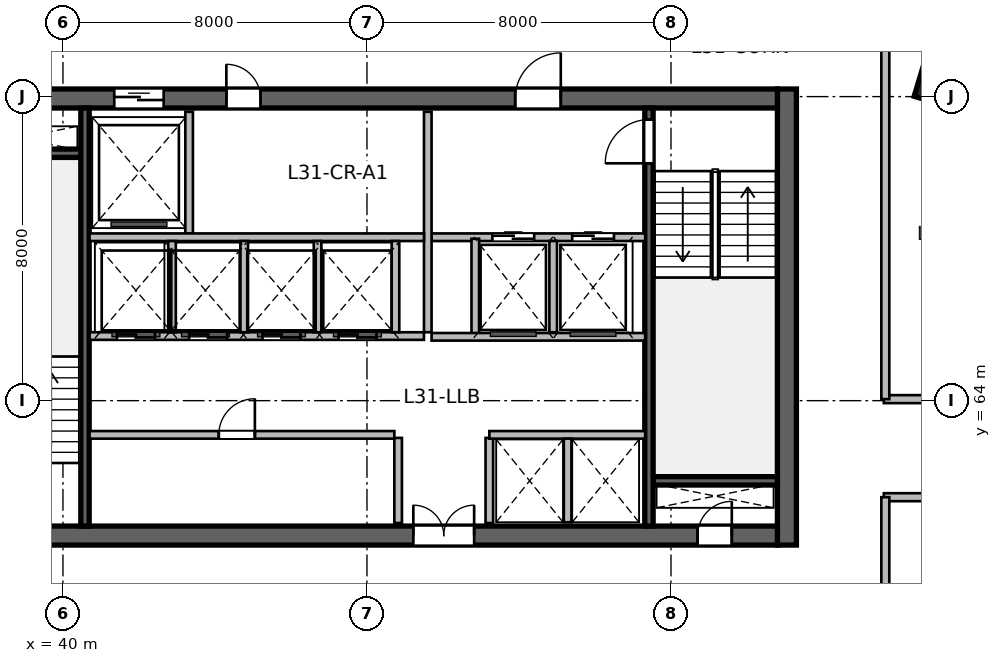
"""IFC4 building model, lengths in metres.
Left out: names, types, materials, properties, quantities, classifications, styles, units other than length and angle.
Written with IfcOpenShell. Run it as: python <this file> out.ifc"""

import sys

from ifc_helpers import new_model, si_unit, direction, frame, frame_2d, origin, origin_2d, place, context, subcontext, project, spatial, rectangle, extrude, source, transform, mapped, element, fill, save


model = new_model("IFC4")
c1 = context("Model", 3, precision=1e-05, world=origin(), true_north=direction((0.0, 1.0)))
c2 = subcontext(c1, "Body", "Model", "MODEL_VIEW")
j1 = project(units=[si_unit("LENGTHUNIT", "METRE"), si_unit("PLANEANGLEUNIT", "RADIAN")], contexts=[c1])
p1 = place(None, origin())
s1 = spatial("IfcSite", under=j1, at=p1, CompositionType="ELEMENT")
p2 = place(p1, origin())
s2 = spatial("IfcBuilding", under=s1, at=p2, CompositionType="ELEMENT")
p3 = place(p2, frame((0.0, 0.0, 131.1)))
s3 = spatial("IfcBuildingStorey", under=s2, at=p3, CompositionType="ELEMENT", Elevation=131.1)
m1 = source(origin(), c2, "Body", "SweptSolid", [
    extrude(rectangle(XDim=12.0, YDim=0.5, at=frame_2d((6.0, 0.0))), origin(), (0.0, 0.0, 1.0), 3.9),
])
p4 = place(p3, frame((59.05, 60.2, 0.0), z_axis=(0.0, 0.0, 1.0), x_axis=(0.0, 1.0, 0.0)))
e1 = element("IfcWall", 1, at=p4, inside=s3, PredefinedType="SHEAR", context=c2, shape_type="MappedRepresentation", body=[
    mapped(m1, transform((0.0, 0.0, 0.0), scale=1.0)),
])
m2 = source(origin(), c2, "Body", "SweptSolid", [
    extrude(rectangle(XDim=21.6, YDim=0.5, at=frame_2d((10.8, 0.0))), origin(), (0.0, 0.0, 1.0), 3.9),
])
p5 = place(p3, frame((37.2, 60.45, 0.0), z_axis=(0.0, 0.0, 1.0), x_axis=(1.0, 0.0, 0.0)))
e2 = element("IfcWall", 2, at=p5, inside=s3, PredefinedType="SHEAR", context=c2, shape_type="MappedRepresentation", body=[
    mapped(m2, transform((0.0, 0.0, 0.0), scale=1.0)),
])
p6 = place(p5, frame((1.1, 0.0, 0.0)))
e3 = element("IfcOpeningElement", 3, at=p6, cuts=e2, PredefinedType="OPENING", context=c2, shape_type="SweptSolid", body=[
    extrude(rectangle(XDim=1.15, YDim=2.15, at=frame_2d((0.575, 1.075))), frame((0.0, 0.26, 0.0), z_axis=(0.0, -1.0, 0.0), x_axis=(1.0, 0.0, 0.0)), (0.0, 0.0, 1.0), 0.52),
])
p7 = place(p5, frame((19.5, 0.0, 0.0)))
e4 = element("IfcOpeningElement", 4, at=p7, cuts=e2, PredefinedType="OPENING", context=c2, shape_type="SweptSolid", body=[
    extrude(rectangle(XDim=0.9, YDim=2.1, at=frame_2d((0.45, 1.05))), frame((0.0, 0.26, 0.0), z_axis=(0.0, -1.0, 0.0), x_axis=(1.0, 0.0, 0.0)), (0.0, 0.0, 1.0), 0.52),
])
p8 = place(p5, frame((12.02, 0.0, 0.0)))
e5 = element("IfcOpeningElement", 5, at=p8, cuts=e2, PredefinedType="OPENING", context=c2, shape_type="SweptSolid", body=[
    extrude(rectangle(XDim=1.6, YDim=2.15, at=frame_2d((0.8, 1.075))), frame((0.0, 0.26, 0.0), z_axis=(0.0, -1.0, 0.0), x_axis=(1.0, 0.0, 0.0)), (0.0, 0.0, 1.0), 0.52),
])
p9 = place(p3, frame((37.2, 71.95, 0.0), z_axis=(0.0, 0.0, 1.0), x_axis=(1.0, 0.0, 0.0)))
e6 = element("IfcWall", 6, at=p9, inside=s3, PredefinedType="SHEAR", context=c2, shape_type="MappedRepresentation", body=[
    mapped(m2, transform((0.0, 0.0, 0.0), scale=1.0)),
])
p10 = place(p9, frame((1.2, 0.0, 0.0)))
e7 = element("IfcOpeningElement", 7, at=p10, cuts=e6, PredefinedType="OPENING", context=c2, shape_type="SweptSolid", body=[
    extrude(rectangle(XDim=0.9, YDim=2.1, at=frame_2d((0.45, 1.05))), frame((0.0, 0.26, 0.0), z_axis=(0.0, -1.0, 0.0), x_axis=(1.0, 0.0, 0.0)), (0.0, 0.0, 1.0), 0.52),
])
p11 = place(p9, frame((14.7, 0.0, 0.0)))
e8 = element("IfcOpeningElement", 8, at=p11, cuts=e6, PredefinedType="OPENING", context=c2, shape_type="SweptSolid", body=[
    extrude(rectangle(XDim=1.2, YDim=2.15, at=frame_2d((0.6, 1.075))), frame((0.0, 0.26, 0.0), z_axis=(0.0, -1.0, 0.0), x_axis=(1.0, 0.0, 0.0)), (0.0, 0.0, 1.0), 0.52),
])
p12 = place(p9, frame((4.15, 0.0, 0.0)))
e9 = element("IfcOpeningElement", 9, at=p12, cuts=e6, PredefinedType="OPENING", context=c2, shape_type="SweptSolid", body=[
    extrude(rectangle(XDim=1.3, YDim=2.15, at=frame_2d((0.65, 1.075))), frame((0.0, 0.26, 0.0), z_axis=(0.0, -1.0, 0.0), x_axis=(1.0, 0.0, 0.0)), (0.0, 0.0, 1.0), 0.52),
])
p13 = place(p9, frame((7.1, 0.0, 0.0)))
e10 = element("IfcOpeningElement", 10, at=p13, cuts=e6, PredefinedType="OPENING", context=c2, shape_type="SweptSolid", body=[
    extrude(rectangle(XDim=0.9, YDim=2.1, at=frame_2d((0.45, 1.05))), frame((0.0, 0.26, 0.0), z_axis=(0.0, -1.0, 0.0), x_axis=(1.0, 0.0, 0.0)), (0.0, 0.0, 1.0), 0.52),
])
m3 = source(origin(), c2, "Body", "SweptSolid", [
    extrude(rectangle(XDim=3.27, YDim=0.22, at=frame_2d((1.635, 0.0))), origin(), (0.0, 0.0, 1.0), 3.9),
])
for number, where, z_axis, x_axis in (
    (11, (37.2, 70.51, 0.0), (0.0, 0.0, 1.0), (1.0, 0.0, 0.0)),
    (12, (55.53, 61.89, 0.0), (0.0, 0.0, 1.0), (1.0, 0.0, 0.0)),
):
    element("IfcWall", number, at=place(p3, frame(where, z_axis=z_axis, x_axis=x_axis)), inside=s3, PredefinedType="SHEAR", context=c2, shape_type="MappedRepresentation", body=[
        mapped(m3, transform((0.0, 0.0, 0.0), scale=1.0)),
    ])
m4 = source(origin(), c2, "Body", "SweptSolid", [
    extrude(rectangle(XDim=11.0, YDim=0.22, at=frame_2d((5.5, 0.0))), origin(), (0.0, 0.0, 1.0), 3.9),
])
p14 = place(p3, frame((40.58, 60.7, 0.0), z_axis=(0.0, 0.0, 1.0), x_axis=(0.0, 1.0, 0.0)))
e13 = element("IfcWall", 13, at=p14, inside=s3, PredefinedType="SHEAR", context=c2, shape_type="MappedRepresentation", body=[
    mapped(m4, transform((0.0, 0.0, 0.0), scale=1.0)),
])
p15 = place(p3, frame((55.42, 60.7, 0.0), z_axis=(0.0, 0.0, 1.0), x_axis=(0.0, 1.0, 0.0)))
e14 = element("IfcWall", 14, at=p15, inside=s3, PredefinedType="SHEAR", context=c2, shape_type="MappedRepresentation", body=[
    mapped(m4, transform((0.0, 0.0, 0.0), scale=1.0)),
])
p16 = place(p15, frame((9.545, 0.0, 0.0)))
e15 = element("IfcOpeningElement", 15, at=p16, cuts=e14, PredefinedType="OPENING", context=c2, shape_type="SweptSolid", body=[
    extrude(rectangle(XDim=1.15, YDim=2.15, at=frame_2d((0.575, 1.075))), frame((0.0, 0.12, 0.0), z_axis=(0.0, -1.0, 0.0), x_axis=(1.0, 0.0, 0.0)), (0.0, 0.0, 1.0), 0.24),
])
m5 = source(origin(), c2, "Body", "SweptSolid", [
    extrude(rectangle(XDim=1.3, YDim=1.3, at=origin_2d()), origin(), (0.0, 0.0, 1.0), 3.9),
])
p17 = place(p3, frame((63.209, 72.442, 0.0), z_axis=(0.0, 0.0, 1.0), x_axis=(0.288697611798, 0.957420330337, 0.0)))
e16 = element("IfcColumn", 16, at=p17, inside=s3, PredefinedType="COLUMN", context=c2, shape_type="MappedRepresentation", body=[
    mapped(m5, transform((0.0, 0.0, 0.0), scale=1.0)),
])
m6 = source(origin(), c2, "Body", "SweptSolid", [
    extrude(rectangle(XDim=2.24, YDim=0.2, at=frame_2d((1.12, 0.0))), origin(), (0.0, 0.0, 1.0), 3.65),
])
for number, where, z_axis, x_axis in (
    (17, (48.82, 60.78, 0.0), (0.0, 0.0, 1.0), (0.0, 1.0, 0.0)),
    (18, (51.22, 60.78, 0.0), (0.0, 0.0, 1.0), (0.0, 1.0, 0.0)),
):
    element("IfcWall", number, at=place(p3, frame(where, z_axis=z_axis, x_axis=x_axis)), inside=s3, PredefinedType="SOLIDWALL", context=c2, shape_type="MappedRepresentation", body=[
        mapped(m6, transform((0.0, 0.0, 0.0), scale=1.0)),
    ])
m7 = source(origin(), c2, "Body", "SweptSolid", [
    extrude(rectangle(XDim=5.62, YDim=0.2, at=frame_2d((2.81, 0.0))), origin(), (0.0, 0.0, 1.0), 3.65),
])
p18 = place(p3, frame((49.7, 68.3, 0.0), z_axis=(0.0, 0.0, 1.0), x_axis=(1.0, 0.0, 0.0)))
e19 = element("IfcWall", 19, at=p18, inside=s3, PredefinedType="SOLIDWALL", context=c2, shape_type="MappedRepresentation", body=[
    mapped(m7, transform((0.0, 0.0, 0.0), scale=1.0)),
])
p19 = place(p18, frame((1.6, 0.0, 0.0)))
e20 = element("IfcOpeningElement", 20, at=p19, cuts=e19, PredefinedType="OPENING", context=c2, shape_type="SweptSolid", body=[
    extrude(rectangle(XDim=1.1, YDim=2.15, at=frame_2d((0.55, 1.075))), frame((0.0, 0.11, 0.0), z_axis=(0.0, -1.0, 0.0), x_axis=(1.0, 0.0, 0.0)), (0.0, 0.0, 1.0), 0.22),
])
p20 = place(p18, frame((3.7, 0.0, 0.0)))
e21 = element("IfcOpeningElement", 21, at=p20, cuts=e19, PredefinedType="OPENING", context=c2, shape_type="SweptSolid", body=[
    extrude(rectangle(XDim=1.1, YDim=2.15, at=frame_2d((0.55, 1.075))), frame((0.0, 0.11, 0.0), z_axis=(0.0, -1.0, 0.0), x_axis=(1.0, 0.0, 0.0)), (0.0, 0.0, 1.0), 0.22),
])
m8 = source(origin(), c2, "Body", "SweptSolid", [
    extrude(rectangle(XDim=5.8, YDim=0.2, at=frame_2d((2.9, 0.0))), origin(), (0.0, 0.0, 1.0), 3.65),
])
p21 = place(p3, frame((49.6, 65.8, 0.0), z_axis=(0.0, 0.0, 1.0), x_axis=(0.0, 1.0, 0.0)))
e22 = element("IfcWall", 22, at=p21, inside=s3, PredefinedType="SOLIDWALL", context=c2, shape_type="MappedRepresentation", body=[
    mapped(m8, transform((0.0, 0.0, 0.0), scale=1.0)),
])
m9 = source(origin(), c2, "Body", "SweptSolid", [
    extrude(rectangle(XDim=2.58, YDim=0.2, at=frame_2d((1.29, 0.0))), origin(), (0.0, 0.0, 1.0), 3.65),
])
p22 = place(p3, frame((50.85, 65.68, 0.0), z_axis=(0.0, 0.0, 1.0), x_axis=(0.0, 1.0, 0.0)))
e23 = element("IfcWall", 23, at=p22, inside=s3, PredefinedType="SOLIDWALL", context=c2, shape_type="MappedRepresentation", body=[
    mapped(m9, transform((0.0, 0.0, 0.0), scale=1.0)),
])
m10 = source(origin(), c2, "Body", "SweptSolid", [
    extrude(rectangle(XDim=2.4, YDim=0.2, at=frame_2d((1.2, 0.0))), origin(), (0.0, 0.0, 1.0), 3.65),
])
p23 = place(p3, frame((52.9, 65.8, 0.0), z_axis=(0.0, 0.0, 1.0), x_axis=(0.0, 1.0, 0.0)))
e24 = element("IfcWall", 24, at=p23, inside=s3, PredefinedType="SOLIDWALL", context=c2, shape_type="MappedRepresentation", body=[
    mapped(m10, transform((0.0, 0.0, 0.0), scale=1.0)),
])
p24 = place(p3, frame((49.7, 65.68, 0.0), z_axis=(0.0, 0.0, 1.0), x_axis=(1.0, 0.0, 0.0)))
e25 = element("IfcWall", 25, at=p24, inside=s3, PredefinedType="SOLIDWALL", context=c2, shape_type="MappedRepresentation", body=[
    mapped(m7, transform((0.0, 0.0, 0.0), scale=1.0)),
])
m11 = source(origin(), c2, "Body", "SweptSolid", [
    extrude(rectangle(XDim=3.2, YDim=0.2, at=frame_2d((1.6, 0.0))), origin(), (0.0, 0.0, 1.0), 3.65),
])
p25 = place(p3, frame((43.32, 68.4, 0.0), z_axis=(0.0, 0.0, 1.0), x_axis=(0.0, 1.0, 0.0)))
e26 = element("IfcWall", 26, at=p25, inside=s3, PredefinedType="SOLIDWALL", context=c2, shape_type="MappedRepresentation", body=[
    mapped(m11, transform((0.0, 0.0, 0.0), scale=1.0)),
])
m12 = source(origin(), c2, "Body", "SweptSolid", [
    extrude(rectangle(XDim=8.8, YDim=0.2, at=frame_2d((4.4, 0.0))), origin(), (0.0, 0.0, 1.0), 3.65),
])
p26 = place(p3, frame((40.7, 68.3, 0.0), z_axis=(0.0, 0.0, 1.0), x_axis=(1.0, 0.0, 0.0)))
e27 = element("IfcWall", 27, at=p26, inside=s3, PredefinedType="SOLIDWALL", context=c2, shape_type="MappedRepresentation", body=[
    mapped(m12, transform((0.0, 0.0, 0.0), scale=1.0)),
])
m13 = source(origin(), c2, "Body", "SweptSolid", [
    extrude(rectangle(XDim=8.02, YDim=0.2, at=frame_2d((4.01, 0.0))), origin(), (0.0, 0.0, 1.0), 3.65),
])
p27 = place(p3, frame((40.7, 63.1, 0.0), z_axis=(0.0, 0.0, 1.0), x_axis=(1.0, 0.0, 0.0)))
e28 = element("IfcWall", 28, at=p27, inside=s3, PredefinedType="SOLIDWALL", context=c2, shape_type="MappedRepresentation", body=[
    mapped(m13, transform((0.0, 0.0, 0.0), scale=1.0)),
])
p28 = place(p27, frame((3.4, 0.0, 0.0)))
e29 = element("IfcOpeningElement", 29, at=p28, cuts=e28, PredefinedType="OPENING", context=c2, shape_type="SweptSolid", body=[
    extrude(rectangle(XDim=0.95, YDim=2.15, at=frame_2d((0.475, 1.075))), frame((0.0, 0.11, 0.0), z_axis=(0.0, -1.0, 0.0), x_axis=(1.0, 0.0, 0.0)), (0.0, 0.0, 1.0), 0.22),
])
m14 = source(origin(), c2, "Body", "SweptSolid", [
    extrude(rectangle(XDim=4.1, YDim=0.2, at=frame_2d((2.05, 0.0))), origin(), (0.0, 0.0, 1.0), 3.65),
])
p29 = place(p3, frame((51.22, 63.1, 0.0), z_axis=(0.0, 0.0, 1.0), x_axis=(1.0, 0.0, 0.0)))
e30 = element("IfcWall", 30, at=p29, inside=s3, PredefinedType="SOLIDWALL", context=c2, shape_type="MappedRepresentation", body=[
    mapped(m14, transform((0.0, 0.0, 0.0), scale=1.0)),
])
m15 = source(origin(), c2, "Body", "SweptSolid", [
    extrude(rectangle(XDim=2.2, YDim=0.2, at=frame_2d((1.1, 0.0))), origin(), (0.0, 0.0, 1.0), 3.65),
])
p30 = place(p3, frame((53.28, 60.8, 0.0), z_axis=(0.0, 0.0, 1.0), x_axis=(0.0, 1.0, 0.0)))
e31 = element("IfcWall", 31, at=p30, inside=s3, PredefinedType="SOLIDWALL", context=c2, shape_type="MappedRepresentation", body=[
    mapped(m15, transform((0.0, 0.0, 0.0), scale=1.0)),
])
p31 = place(p3, frame((40.7, 65.7, 0.0), z_axis=(0.0, 0.0, 1.0), x_axis=(1.0, 0.0, 0.0)))
e32 = element("IfcWall", 32, at=p31, inside=s3, PredefinedType="SOLIDWALL", context=c2, shape_type="MappedRepresentation", body=[
    mapped(m12, transform((0.0, 0.0, 0.0), scale=1.0)),
])
p32 = place(p31, frame((0.72, 0.0, 0.0)))
e33 = element("IfcOpeningElement", 33, at=p32, cuts=e32, PredefinedType="OPENING", context=c2, shape_type="SweptSolid", body=[
    extrude(rectangle(XDim=1.0, YDim=2.15, at=frame_2d((0.5, 1.075))), frame((0.0, 0.11, 0.0), z_axis=(0.0, -1.0, 0.0), x_axis=(1.0, 0.0, 0.0)), (0.0, 0.0, 1.0), 0.22),
])
p33 = place(p31, frame((2.62, 0.0, 0.0)))
e34 = element("IfcOpeningElement", 34, at=p33, cuts=e32, PredefinedType="OPENING", context=c2, shape_type="SweptSolid", body=[
    extrude(rectangle(XDim=1.0, YDim=2.15, at=frame_2d((0.5, 1.075))), frame((0.0, 0.11, 0.0), z_axis=(0.0, -1.0, 0.0), x_axis=(1.0, 0.0, 0.0)), (0.0, 0.0, 1.0), 0.22),
])
p34 = place(p31, frame((4.55, 0.0, 0.0)))
e35 = element("IfcOpeningElement", 35, at=p34, cuts=e32, PredefinedType="OPENING", context=c2, shape_type="SweptSolid", body=[
    extrude(rectangle(XDim=1.0, YDim=2.15, at=frame_2d((0.5, 1.075))), frame((0.0, 0.11, 0.0), z_axis=(0.0, -1.0, 0.0), x_axis=(1.0, 0.0, 0.0)), (0.0, 0.0, 1.0), 0.22),
])
p35 = place(p31, frame((6.55, 0.0, 0.0)))
e36 = element("IfcOpeningElement", 36, at=p35, cuts=e32, PredefinedType="OPENING", context=c2, shape_type="SweptSolid", body=[
    extrude(rectangle(XDim=1.0, YDim=2.15, at=frame_2d((0.5, 1.075))), frame((0.0, 0.11, 0.0), z_axis=(0.0, -1.0, 0.0), x_axis=(1.0, 0.0, 0.0)), (0.0, 0.0, 1.0), 0.22),
])
for number, where, z_axis, x_axis in (
    (37, (48.75, 65.8, 0.0), (0.0, 0.0, 1.0), (0.0, 1.0, 0.0)),
    (38, (42.87, 65.8, 0.0), (0.0, 0.0, 1.0), (0.0, 1.0, 0.0)),
    (39, (44.77, 65.8, 0.0), (0.0, 0.0, 1.0), (0.0, 1.0, 0.0)),
    (40, (46.7, 65.8, 0.0), (0.0, 0.0, 1.0), (0.0, 1.0, 0.0)),
):
    element("IfcWall", number, at=place(p3, frame(where, z_axis=z_axis, x_axis=x_axis)), inside=s3, PredefinedType="SOLIDWALL", context=c2, shape_type="MappedRepresentation", body=[
        mapped(m10, transform((0.0, 0.0, 0.0), scale=1.0)),
    ])
m16 = source(origin(), c2, "Body", "SweptSolid", [
    extrude(rectangle(XDim=4.2, YDim=0.21, at=frame_2d((2.1, 0.0))), origin(), (0.0, 0.0, 1.0), 3.65),
])
p36 = place(p3, frame((61.6, 64.04, 0.0), z_axis=(0.0, 0.0, 1.0), x_axis=(1.0, 0.0, 0.0)))
e41 = element("IfcWall", 41, at=p36, inside=s3, PredefinedType="PARTITIONING", context=c2, shape_type="MappedRepresentation", body=[
    mapped(m16, transform((0.0, 0.0, 0.0), scale=1.0)),
])
p37 = place(p36, frame((1.625, 0.0, 0.0)))
e42 = element("IfcOpeningElement", 42, at=p37, cuts=e41, PredefinedType="OPENING", context=c2, shape_type="SweptSolid", body=[
    extrude(rectangle(XDim=0.95, YDim=2.1, at=frame_2d((0.475, 1.05))), frame((0.0, 0.115, 0.0), z_axis=(0.0, -1.0, 0.0), x_axis=(1.0, 0.0, 0.0)), (0.0, 0.0, 1.0), 0.23),
])
p38 = place(p3, frame((61.6, 61.46, 0.0), z_axis=(0.0, 0.0, 1.0), x_axis=(1.0, 0.0, 0.0)))
e43 = element("IfcWall", 43, at=p38, inside=s3, PredefinedType="PARTITIONING", context=c2, shape_type="MappedRepresentation", body=[
    mapped(m16, transform((0.0, 0.0, 0.0), scale=1.0)),
])
p39 = place(p38, frame((1.625, 0.0, 0.0)))
e44 = element("IfcOpeningElement", 44, at=p39, cuts=e43, PredefinedType="OPENING", context=c2, shape_type="SweptSolid", body=[
    extrude(rectangle(XDim=0.95, YDim=2.1, at=frame_2d((0.475, 1.05))), frame((0.0, 0.115, 0.0), z_axis=(0.0, -1.0, 0.0), x_axis=(1.0, 0.0, 0.0)), (0.0, 0.0, 1.0), 0.23),
])
m17 = source(origin(), c2, "Body", "SweptSolid", [
    extrude(rectangle(XDim=13.988, YDim=0.21, at=frame_2d((6.994, 0.0))), origin(), (0.0, 0.0, 1.0), 2.942),
])
p40 = place(p3, frame((61.64, 47.472, 0.0), z_axis=(0.0, 0.0, 1.0), x_axis=(0.0, 1.0, 0.0)))
e45 = element("IfcWall", 45, at=p40, inside=s3, PredefinedType="PARTITIONING", context=c2, shape_type="MappedRepresentation", body=[
    mapped(m17, transform((0.0, 0.0, 0.0), scale=1.0)),
])
m18 = source(origin(), c2, "Body", "SweptSolid", [
    extrude(rectangle(XDim=11.987, YDim=0.21, at=frame_2d((5.994, 0.0))), origin(), (0.0, 0.0, 1.0), 3.65),
])
p41 = place(p3, frame((61.64, 64.04, 0.0), z_axis=(0.0, 0.0, 1.0), x_axis=(0.0, 1.0, 0.0)))
e46 = element("IfcWall", 46, at=p41, inside=s3, PredefinedType="PARTITIONING", context=c2, shape_type="MappedRepresentation", body=[
    mapped(m18, transform((0.0, 0.0, 0.0), scale=1.0)),
])
m19 = source(origin(), c2, "Body", "SweptSolid", [
    extrude(rectangle(XDim=0.9, YDim=2.1, at=frame_2d((0.45, 1.05))), frame((0.0, 0.025, 0.0), z_axis=(0.0, -1.0, 0.0), x_axis=(1.0, 0.0, 0.0)), (0.0, 0.0, 1.0), 0.05),
])
p42 = place(p7, origin())
e47 = element("IfcDoor", 47, at=p42, inside=s3, OperationType="SINGLE_SWING_RIGHT", PredefinedType="DOOR", context=c2, shape_type="MappedRepresentation", body=[
    mapped(m19, transform((0.0, 0.0, 0.0), scale=1.0)),
])
fill(e4, e47)
m20 = source(origin(), c2, "Body", "SweptSolid", [
    extrude(rectangle(XDim=1.15, YDim=2.15, at=frame_2d((0.575, 1.075))), frame((0.0, 0.025, 0.0), z_axis=(0.0, -1.0, 0.0), x_axis=(1.0, 0.0, 0.0)), (0.0, 0.0, 1.0), 0.05),
])
p43 = place(p16, origin())
e48 = element("IfcDoor", 48, at=p43, inside=s3, OperationType="SINGLE_SWING_LEFT", PredefinedType="DOOR", context=c2, shape_type="MappedRepresentation", body=[
    mapped(m20, transform((0.0, 0.0, 0.0), scale=1.0)),
])
fill(e15, e48)
m21 = source(origin(), c2, "Body", "SweptSolid", [
    extrude(rectangle(XDim=1.6, YDim=2.15, at=frame_2d((0.8, 1.075))), frame((0.0, 0.025, 0.0), z_axis=(0.0, -1.0, 0.0), x_axis=(1.0, 0.0, 0.0)), (0.0, 0.0, 1.0), 0.05),
])
p44 = place(p8, origin())
e49 = element("IfcDoor", 49, at=p44, inside=s3, OperationType="DOUBLE_DOOR_SINGLE_SWING", PredefinedType="DOOR", context=c2, shape_type="MappedRepresentation", body=[
    mapped(m21, transform((0.0, 0.0, 0.0), scale=1.0)),
])
fill(e5, e49)
m22 = source(origin(), c2, "Body", "SweptSolid", [
    extrude(rectangle(XDim=1.2, YDim=2.15, at=frame_2d((0.6, 1.075))), frame((0.0, 0.025, 0.0), z_axis=(0.0, -1.0, 0.0), x_axis=(1.0, 0.0, 0.0)), (0.0, 0.0, 1.0), 0.05),
])
p45 = place(p11, origin())
e50 = element("IfcDoor", 50, at=p45, inside=s3, OperationType="SINGLE_SWING_RIGHT", PredefinedType="DOOR", context=c2, shape_type="MappedRepresentation", body=[
    mapped(m22, transform((0.0, 0.0, 0.0), scale=1.0)),
])
fill(e8, e50)
m23 = source(origin(), c2, "Body", "SweptSolid", [
    extrude(rectangle(XDim=1.1, YDim=2.15, at=frame_2d((0.55, 1.075))), frame((0.0, 0.025, 0.0), z_axis=(0.0, -1.0, 0.0), x_axis=(1.0, 0.0, 0.0)), (0.0, 0.0, 1.0), 0.05),
])
p46 = place(p19, origin())
e51 = element("IfcDoor", 51, at=p46, inside=s3, OperationType="DOUBLE_DOOR_SLIDING", PredefinedType="DOOR", context=c2, shape_type="MappedRepresentation", body=[
    mapped(m23, transform((0.0, 0.0, 0.0), scale=1.0)),
])
fill(e20, e51)
p47 = place(p20, origin())
e52 = element("IfcDoor", 52, at=p47, inside=s3, OperationType="DOUBLE_DOOR_SLIDING", PredefinedType="DOOR", context=c2, shape_type="MappedRepresentation", body=[
    mapped(m23, transform((0.0, 0.0, 0.0), scale=1.0)),
])
fill(e21, e52)
m24 = source(origin(), c2, "Body", "SweptSolid", [
    extrude(rectangle(XDim=1.3, YDim=2.15, at=frame_2d((0.65, 1.075))), frame((0.0, 0.025, 0.0), z_axis=(0.0, -1.0, 0.0), x_axis=(1.0, 0.0, 0.0)), (0.0, 0.0, 1.0), 0.05),
])
p48 = place(p12, origin())
e53 = element("IfcDoor", 53, at=p48, inside=s3, OperationType="DOUBLE_DOOR_SLIDING", PredefinedType="DOOR", context=c2, shape_type="MappedRepresentation", body=[
    mapped(m24, transform((0.0, 0.0, 0.0), scale=1.0)),
])
fill(e9, e53)
p49 = place(p13, origin())
e54 = element("IfcDoor", 54, at=p49, inside=s3, OperationType="SINGLE_SWING_LEFT", PredefinedType="DOOR", context=c2, shape_type="MappedRepresentation", body=[
    mapped(m19, transform((0.0, 0.0, 0.0), scale=1.0)),
])
fill(e10, e54)
m25 = source(origin(), c2, "Body", "SweptSolid", [
    extrude(rectangle(XDim=0.95, YDim=2.15, at=frame_2d((0.475, 1.075))), frame((0.0, 0.025, 0.0), z_axis=(0.0, -1.0, 0.0), x_axis=(1.0, 0.0, 0.0)), (0.0, 0.0, 1.0), 0.05),
])
p50 = place(p28, origin())
e55 = element("IfcDoor", 55, at=p50, inside=s3, OperationType="SINGLE_SWING_RIGHT", PredefinedType="DOOR", context=c2, shape_type="MappedRepresentation", body=[
    mapped(m25, transform((0.0, 0.0, 0.0), scale=1.0)),
])
fill(e29, e55)
m26 = source(origin(), c2, "Body", "SweptSolid", [
    extrude(rectangle(XDim=1.0, YDim=2.15, at=frame_2d((0.5, 1.075))), frame((0.0, 0.025, 0.0), z_axis=(0.0, -1.0, 0.0), x_axis=(1.0, 0.0, 0.0)), (0.0, 0.0, 1.0), 0.05),
])
p51 = place(p32, origin())
e56 = element("IfcDoor", 56, at=p51, inside=s3, OperationType="DOUBLE_DOOR_SLIDING", PredefinedType="DOOR", context=c2, shape_type="MappedRepresentation", body=[
    mapped(m26, transform((0.0, 0.0, 0.0), scale=1.0)),
])
fill(e33, e56)
p52 = place(p33, origin())
e57 = element("IfcDoor", 57, at=p52, inside=s3, OperationType="DOUBLE_DOOR_SLIDING", PredefinedType="DOOR", context=c2, shape_type="MappedRepresentation", body=[
    mapped(m26, transform((0.0, 0.0, 0.0), scale=1.0)),
])
fill(e34, e57)
p53 = place(p34, origin())
e58 = element("IfcDoor", 58, at=p53, inside=s3, OperationType="DOUBLE_DOOR_SLIDING", PredefinedType="DOOR", context=c2, shape_type="MappedRepresentation", body=[
    mapped(m26, transform((0.0, 0.0, 0.0), scale=1.0)),
])
fill(e35, e58)
p54 = place(p35, origin())
e59 = element("IfcDoor", 59, at=p54, inside=s3, OperationType="DOUBLE_DOOR_SLIDING", PredefinedType="DOOR", context=c2, shape_type="MappedRepresentation", body=[
    mapped(m26, transform((0.0, 0.0, 0.0), scale=1.0)),
])
fill(e36, e59)
save(model, sys.argv[1])
